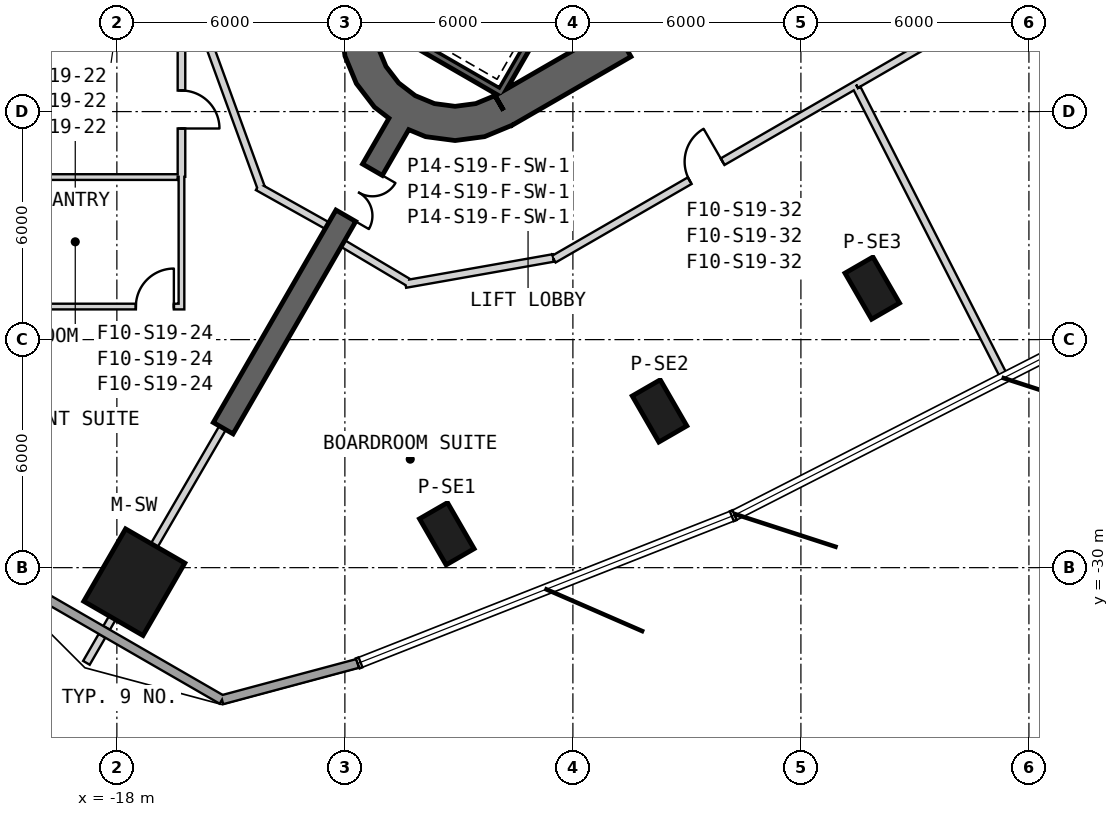
"""IFC4 building model, lengths in metres.
Left out: names, types, materials, properties, quantities, classifications, styles, units other than length and angle.
Written with IfcOpenShell. Run it as: python <this file> out.ifc"""

import sys

from ifc_helpers import new_model, si_unit, direction, frame, frame_2d, origin, origin_2d, place, context, subcontext, project, spatial, polyline, rectangle, outline, extrude, element, fill, save


model = new_model("IFC4")
c1 = context("Model", 3, precision=1e-05, world=origin(), true_north=direction((0.0, 1.0)))
c2 = subcontext(c1, "Body", "Model", "MODEL_VIEW")
j1 = project(units=[si_unit("LENGTHUNIT", "METRE"), si_unit("PLANEANGLEUNIT", "RADIAN")], contexts=[c1])
p1 = place(None, origin())
s1 = spatial("IfcSite", under=j1, at=p1, CompositionType="ELEMENT")
p2 = place(p1, origin())
s2 = spatial("IfcBuilding", under=s1, at=p2, CompositionType="ELEMENT")
p3 = place(p2, frame((0.0, 0.0, 310.4)))
s3 = spatial("IfcBuildingStorey", under=s2, at=p3, CompositionType="ELEMENT", Elevation=310.4)
p4 = place(p3, frame((-17.542, -30.383, 0.0), z_axis=(0.0, 0.0, 1.0), x_axis=(-0.5, -0.866025403784, 0.0)))
e1 = element("IfcColumn", 1, at=p4, inside=s3, PredefinedType="COLUMN", context=c2, shape_type="SweptSolid", body=[
    extrude(rectangle(XDim=2.2, YDim=1.8, at=origin_2d()), origin(), (0.0, 0.0, 1.0), 3.9),
])
for number, where, z_axis, x_axis in (
    (2, (-9.318, -29.108, 0.0), (0.0, 0.0, 1.0), (0.5, -0.866, 0.0)),
    (3, (-3.72, -25.876, 0.0), (0.0, 0.0, 1.0), (0.5, -0.866, 0.0)),
    (4, (1.878, -22.644, 0.0), (0.0, 0.0, 1.0), (0.5, -0.866, 0.0)),
):
    element("IfcColumn", number, at=place(p3, frame(where, z_axis=z_axis, x_axis=x_axis)), inside=s3, PredefinedType="COLUMN", context=c2, shape_type="SweptSolid", body=[
        extrude(rectangle(XDim=1.4, YDim=0.85, at=origin_2d()), origin(), (0.0, 0.0, 1.0), 3.9),
    ])
p5 = place(p3, frame((-7.825, -17.97, 0.0), z_axis=(0.0, 0.0, 1.0), x_axis=(0.866028369851, 0.499994862586, 0.0)))
e5 = element("IfcWall", 5, at=p5, inside=s3, PredefinedType="SHEAR", context=c2, shape_type="SweptSolid", body=[
    extrude(rectangle(XDim=31.523, YDim=0.9, at=frame_2d((15.762, 0.0))), origin(), (0.0, 0.0, 1.0), 3.9),
])
p6 = place(p5, frame((17.862, 0.0, 0.0)))
e6 = element("IfcOpeningElement", 6, at=p6, cuts=e5, PredefinedType="OPENING", context=c2, shape_type="SweptSolid", body=[
    extrude(rectangle(XDim=1.2, YDim=2.4, at=frame_2d((0.6, 1.2))), frame((0.0, 0.46, 0.0), z_axis=(0.0, -1.0, 0.0), x_axis=(1.0, 0.0, 0.0)), (0.0, 0.0, 1.0), 0.92),
])
p7 = place(p5, frame((20.562, 0.0, 0.0)))
e7 = element("IfcOpeningElement", 7, at=p7, cuts=e5, PredefinedType="OPENING", context=c2, shape_type="SweptSolid", body=[
    extrude(rectangle(XDim=1.2, YDim=2.4, at=frame_2d((0.6, 1.2))), frame((0.0, 0.46, 0.0), z_axis=(0.0, -1.0, 0.0), x_axis=(1.0, 0.0, 0.0)), (0.0, 0.0, 1.0), 0.92),
])
p8 = place(p5, frame((26.712, 0.0, 0.0)))
e8 = element("IfcOpeningElement", 8, at=p8, cuts=e5, PredefinedType="OPENING", context=c2, shape_type="SweptSolid", body=[
    extrude(rectangle(XDim=1.2, YDim=2.4, at=frame_2d((0.6, 1.2))), frame((0.0, 0.46, 0.0), z_axis=(0.0, -1.0, 0.0), x_axis=(1.0, 0.0, 0.0)), (0.0, 0.0, 1.0), 0.92),
])
p9 = place(p5, frame((3.612, 0.0, 0.0)))
e9 = element("IfcOpeningElement", 9, at=p9, cuts=e5, PredefinedType="OPENING", context=c2, shape_type="SweptSolid", body=[
    extrude(rectangle(XDim=1.2, YDim=2.4, at=frame_2d((0.6, 1.2))), frame((0.0, 0.46, 0.0), z_axis=(0.0, -1.0, 0.0), x_axis=(1.0, 0.0, 0.0)), (0.0, 0.0, 1.0), 0.92),
])
p10 = place(p3, origin())
e10 = element("IfcWall", 10, at=p10, inside=s3, PredefinedType="SHEAR", context=c2, shape_type="SweptSolid", body=[
    extrude(outline(polyline([(-12.1, -15.762), (-11.998, -16.538), (-11.698, -17.262), (-11.221, -17.883), (-10.6, -18.36), (-9.876, -18.659), (-9.1, -18.762), (-8.323, -18.659), (-7.6, -18.36), (-8.05, -17.58), (-8.556, -17.79), (-9.1, -17.862), (-9.644, -17.79), (-10.15, -17.58), (-10.585, -17.247), (-10.919, -16.812), (-11.128, -16.305), (-11.2, -15.762), (-12.1, -15.762)])), origin(), (0.0, 0.0, 1.0), 3.9),
])
p11 = place(p3, frame((-10.575, -18.316, 0.0), z_axis=(0.0, 0.0, 1.0), x_axis=(-0.500009446655, -0.866019949687, 0.0)))
e11 = element("IfcWall", 11, at=p11, inside=s3, PredefinedType="SHEAR", context=c2, shape_type="SweptSolid", body=[
    extrude(rectangle(XDim=9.254, YDim=0.6, at=frame_2d((4.627, 0.0))), origin(), (0.0, 0.0, 1.0), 3.9),
])
p12 = place(p11, frame((1.4, 0.0, 0.0)))
e12 = element("IfcOpeningElement", 12, at=p12, cuts=e11, PredefinedType="OPENING", context=c2, shape_type="SweptSolid", body=[
    extrude(rectangle(XDim=1.4, YDim=2.4, at=frame_2d((0.7, 1.2))), frame((0.0, 0.31, 0.0), z_axis=(0.0, -1.0, 0.0), x_axis=(1.0, 0.0, 0.0)), (0.0, 0.0, 1.0), 0.62),
])
p13 = place(p3, frame((-21.375, -29.931, 0.0), z_axis=(0.0, 0.0, 1.0), x_axis=(0.866031377081, -0.499989653803, 0.0)))
e13 = element("IfcWall", 13, at=p13, inside=s3, PredefinedType="SOLIDWALL", context=c2, shape_type="SweptSolid", body=[
    extrude(rectangle(XDim=7.092, YDim=0.24, at=frame_2d((3.546, 0.0))), origin(), (0.0, 0.0, 1.0), 3.6),
])
p14 = place(p3, frame((-15.233, -33.477, 0.0), z_axis=(0.0, 0.0, 1.0), x_axis=(0.965938323568, 0.258772400119, 0.0)))
e14 = element("IfcWall", 14, at=p14, inside=s3, PredefinedType="SOLIDWALL", context=c2, shape_type="SweptSolid", body=[
    extrude(rectangle(XDim=3.697, YDim=0.24, at=frame_2d((1.848, 0.0))), origin(), (0.0, 0.0, 1.0), 3.6),
])
p15 = place(p3, frame((-3.905, -10.563, -0.3), z_axis=(0.0, 0.0, 1.0), x_axis=(-0.500012932018, -0.866017937352, 0.0)))
e15 = element("IfcWall", 15, at=p15, inside=s3, PredefinedType="SHEAR", context=c2, shape_type="SweptSolid", body=[
    extrude(rectangle(XDim=8.1, YDim=0.2, at=frame_2d((4.05, 0.0))), origin(), (0.0, 0.0, 1.0), 3.9),
])
p16 = place(p3, frame((-11.282, -15.541, -0.3), z_axis=(0.0, 0.0, 1.0), x_axis=(0.866000483506, -0.500043160704, 0.0)))
e16 = element("IfcWall", 16, at=p16, inside=s3, PredefinedType="SHEAR", context=c2, shape_type="SweptSolid", body=[
    extrude(rectangle(XDim=3.8, YDim=0.2, at=frame_2d((1.9, 0.0))), origin(), (0.0, 0.0, 1.0), 3.9),
])
p17 = place(p3, frame((-14.293, -19.978, 0.0), z_axis=(0.0, 0.0, 1.0), x_axis=(0.872510000486, -0.48859625362, 0.0)))
e17 = element("IfcWall", 17, at=p17, inside=s3, PredefinedType="PARTITIONING", context=c2, shape_type="SweptSolid", body=[
    extrude(rectangle(XDim=2.09, YDim=0.2, at=frame_2d((1.045, 0.0))), origin(), (0.0, 0.0, 1.0), 3.6),
])
p18 = place(p3, frame((-15.534, -16.346, 0.0), z_axis=(0.0, 0.0, 1.0), x_axis=(0.342001008711, -0.939699584996, 0.0)))
e18 = element("IfcWall", 18, at=p18, inside=s3, PredefinedType="PARTITIONING", context=c2, shape_type="SweptSolid", body=[
    extrude(rectangle(XDim=3.875, YDim=0.2, at=frame_2d((1.938, 0.0))), origin(), (0.0, 0.0, 1.0), 2.88),
])
p19 = place(p3, frame((-6.505, -21.885, 0.0), z_axis=(0.0, 0.0, 1.0), x_axis=(0.8660236234, 0.500003083703, 0.0)))
e19 = element("IfcWall", 19, at=p19, inside=s3, PredefinedType="PARTITIONING", context=c2, shape_type="SweptSolid", body=[
    extrude(rectangle(XDim=9.188, YDim=0.2, at=frame_2d((4.594, 0.0))), origin(), (0.0, 0.0, 1.0), 2.88),
])
p20 = place(p19, frame((4.132, 0.0, 0.0)))
e20 = element("IfcOpeningElement", 20, at=p20, cuts=e19, PredefinedType="OPENING", context=c2, shape_type="SweptSolid", body=[
    extrude(rectangle(XDim=1.0, YDim=2.1, at=frame_2d((0.5, 1.05))), frame((0.0, 0.11, 0.0), z_axis=(0.0, -1.0, 0.0), x_axis=(1.0, 0.0, 0.0)), (0.0, 0.0, 1.0), 0.22),
])
p21 = place(p3, frame((1.451, -17.291, 0.0), z_axis=(0.0, 0.0, 1.0), x_axis=(0.866027540469, 0.499996299136, 0.0)))
e21 = element("IfcWall", 21, at=p21, inside=s3, PredefinedType="PARTITIONING", context=c2, shape_type="SweptSolid", body=[
    extrude(rectangle(XDim=15.82, YDim=0.2, at=frame_2d((7.91, 0.0))), origin(), (0.0, 0.0, 1.0), 2.97),
])
p22 = place(p21, frame((7.399, 0.0, 0.0)))
e22 = element("IfcOpeningElement", 22, at=p22, cuts=e21, PredefinedType="OPENING", context=c2, shape_type="SweptSolid", body=[
    extrude(rectangle(XDim=1.0, YDim=2.1, at=frame_2d((0.5, 1.05))), frame((0.0, 0.11, 0.0), z_axis=(0.0, -1.0, 0.0), x_axis=(1.0, 0.0, 0.0)), (0.0, 0.0, 1.0), 0.22),
])
p23 = place(p3, frame((-10.406, -22.538, 0.0), z_axis=(0.0, 0.0, 1.0), x_axis=(0.98480284819, 0.173675991999, 0.0)))
e23 = element("IfcWall", 23, at=p23, inside=s3, PredefinedType="PARTITIONING", context=c2, shape_type="SweptSolid", body=[
    extrude(rectangle(XDim=3.949, YDim=0.2, at=frame_2d((1.974, 0.0))), origin(), (0.0, 0.0, 1.0), 2.88),
])
p24 = place(p3, frame((-12.05, -21.472, 0.0), z_axis=(0.0, 0.0, 1.0), x_axis=(0.859577966481, -0.511004617924, 0.0)))
e24 = element("IfcWall", 24, at=p24, inside=s3, PredefinedType="PARTITIONING", context=c2, shape_type="SweptSolid", body=[
    extrude(rectangle(XDim=1.998, YDim=0.2, at=frame_2d((0.999, 0.0))), origin(), (0.0, 0.0, 1.0), 3.6),
])
p25 = place(p3, frame((-18.117, -31.32, 0.0), z_axis=(0.0, 0.0, 1.0), x_axis=(-0.500091252813, -0.865972712538, 0.0)))
e25 = element("IfcWall", 25, at=p25, inside=s3, PredefinedType="PARTITIONING", context=c2, shape_type="SweptSolid", body=[
    extrude(rectangle(XDim=0.306, YDim=0.2, at=frame_2d((0.153, 0.0))), origin(), (0.0, 0.0, 1.0), 3.6),
])
p26 = place(p3, frame((-18.39, -31.793, 0.0), z_axis=(0.0, 0.0, 1.0), x_axis=(-0.499970888758, -0.866042210515, 0.0)))
e26 = element("IfcWall", 26, at=p26, inside=s3, PredefinedType="PARTITIONING", context=c2, shape_type="SweptSolid", body=[
    extrude(rectangle(XDim=0.822, YDim=0.2, at=frame_2d((0.411, 0.0))), origin(), (0.0, 0.0, 1.0), 3.6),
])
p27 = place(p3, frame((-15.218, -26.321, 0.0), z_axis=(0.0, 0.0, 1.0), x_axis=(-0.50277219784, -0.864418947663, 0.0)))
e27 = element("IfcWall", 27, at=p27, inside=s3, PredefinedType="PARTITIONING", context=c2, shape_type="SweptSolid", body=[
    extrude(rectangle(XDim=3.579, YDim=0.2, at=frame_2d((1.79, 0.0))), origin(), (0.0, 0.0, 1.0), 3.17),
])
p28 = place(p3, frame((-16.3, -16.115, 0.0), z_axis=(0.0, 0.0, 1.0), x_axis=(0.0, -1.0, 0.0)))
e28 = element("IfcWall", 28, at=p28, inside=s3, PredefinedType="PARTITIONING", context=c2, shape_type="SweptSolid", body=[
    extrude(rectangle(XDim=3.6, YDim=0.2, at=frame_2d((1.8, 0.0))), origin(), (0.0, 0.0, 1.0), 2.88),
])
p29 = place(p28, frame((1.33, 0.0, 0.0)))
e29 = element("IfcOpeningElement", 29, at=p29, cuts=e28, PredefinedType="OPENING", context=c2, shape_type="SweptSolid", body=[
    extrude(rectangle(XDim=1.0, YDim=2.1, at=frame_2d((0.5, 1.05))), frame((0.0, 0.11, 0.0), z_axis=(0.0, -1.0, 0.0), x_axis=(1.0, 0.0, 0.0)), (0.0, 0.0, 1.0), 0.22),
])
p30 = place(p3, frame((-21.815, -23.13, 0.0), z_axis=(0.0, 0.0, 1.0), x_axis=(1.0, 0.0, 0.0)))
e30 = element("IfcWall", 30, at=p30, inside=s3, PredefinedType="PLUMBINGWALL", context=c2, shape_type="SweptSolid", body=[
    extrude(rectangle(XDim=5.59, YDim=0.15, at=frame_2d((2.795, 0.0))), origin(), (0.0, 0.0, 1.0), 3.6),
])
p31 = place(p30, frame((4.315, 0.0, 0.0)))
e31 = element("IfcOpeningElement", 31, at=p31, cuts=e30, PredefinedType="OPENING", context=c2, shape_type="SweptSolid", body=[
    extrude(rectangle(XDim=1.0, YDim=2.1, at=frame_2d((0.5, 1.05))), frame((0.0, 0.085, 0.0), z_axis=(0.0, -1.0, 0.0), x_axis=(1.0, 0.0, 0.0)), (0.0, 0.0, 1.0), 0.17),
])
p32 = place(p3, frame((-16.3, -19.715, 0.0), z_axis=(0.0, 0.0, 1.0), x_axis=(0.0, -1.0, 0.0)))
e32 = element("IfcWall", 32, at=p32, inside=s3, PredefinedType="PLUMBINGWALL", context=c2, shape_type="SweptSolid", body=[
    extrude(rectangle(XDim=3.34, YDim=0.15, at=frame_2d((1.67, 0.0))), origin(), (0.0, 0.0, 1.0), 3.6),
])
p33 = place(p3, frame((5.356, -24.997, 0.0), z_axis=(0.0, 0.0, 1.0), x_axis=(-0.454291135593, 0.890853278672, 0.0)))
e33 = element("IfcWall", 33, at=p33, inside=s3, PredefinedType="PARTITIONING", context=c2, shape_type="SweptSolid", body=[
    extrude(rectangle(XDim=8.538, YDim=0.2, at=frame_2d((4.269, 0.0))), origin(), (0.0, 0.0, 1.0), 2.97),
])
p34 = place(p3, frame((-21.79, -19.723, 0.0), z_axis=(0.0, 0.0, 1.0), x_axis=(1.0, 0.0, 0.0)))
e34 = element("IfcWall", 34, at=p34, inside=s3, PredefinedType="PLUMBINGWALL", context=c2, shape_type="SweptSolid", body=[
    extrude(rectangle(XDim=5.39, YDim=0.15, at=frame_2d((2.695, 0.0))), origin(), (0.0, 0.0, 1.0), 2.88),
])
p35 = place(p29, origin())
e35 = element("IfcDoor", 35, at=p35, inside=s3, OperationType="SINGLE_SWING_LEFT", PredefinedType="USERDEFINED", context=c2, shape_type="SweptSolid", body=[
    extrude(rectangle(XDim=1.0, YDim=2.1, at=frame_2d((0.5, 1.05))), frame((0.0, 0.025, 0.0), z_axis=(0.0, -1.0, 0.0), x_axis=(1.0, 0.0, 0.0)), (0.0, 0.0, 1.0), 0.05),
])
fill(e29, e35)
p36 = place(p31, origin())
e36 = element("IfcDoor", 36, at=p36, inside=s3, OperationType="SINGLE_SWING_LEFT", PredefinedType="USERDEFINED", context=c2, shape_type="SweptSolid", body=[
    extrude(rectangle(XDim=1.0, YDim=2.1, at=frame_2d((0.5, 1.05))), frame((0.0, 0.025, 0.0), z_axis=(0.0, -1.0, 0.0), x_axis=(1.0, 0.0, 0.0)), (0.0, 0.0, 1.0), 0.05),
])
fill(e31, e36)
p37 = place(p20, origin())
e37 = element("IfcDoor", 37, at=p37, inside=s3, OperationType="SINGLE_SWING_LEFT", PredefinedType="USERDEFINED", context=c2, shape_type="SweptSolid", body=[
    extrude(rectangle(XDim=1.0, YDim=2.1, at=frame_2d((0.5, 1.05))), frame((0.0, 0.025, 0.0), z_axis=(0.0, -1.0, 0.0), x_axis=(1.0, 0.0, 0.0)), (0.0, 0.0, 1.0), 0.05),
])
fill(e20, e37)
p38 = place(p12, origin())
e38 = element("IfcDoor", 38, at=p38, inside=s3, OperationType="DOUBLE_DOOR_SINGLE_SWING", PredefinedType="NOTDEFINED", context=c2, shape_type="SweptSolid", body=[
    extrude(rectangle(XDim=1.4, YDim=2.4, at=frame_2d((0.7, 1.2))), frame((0.0, 0.025, 0.0), z_axis=(0.0, -1.0, 0.0), x_axis=(1.0, 0.0, 0.0)), (0.0, 0.0, 1.0), 0.05),
])
fill(e12, e38)
save(model, sys.argv[1])
